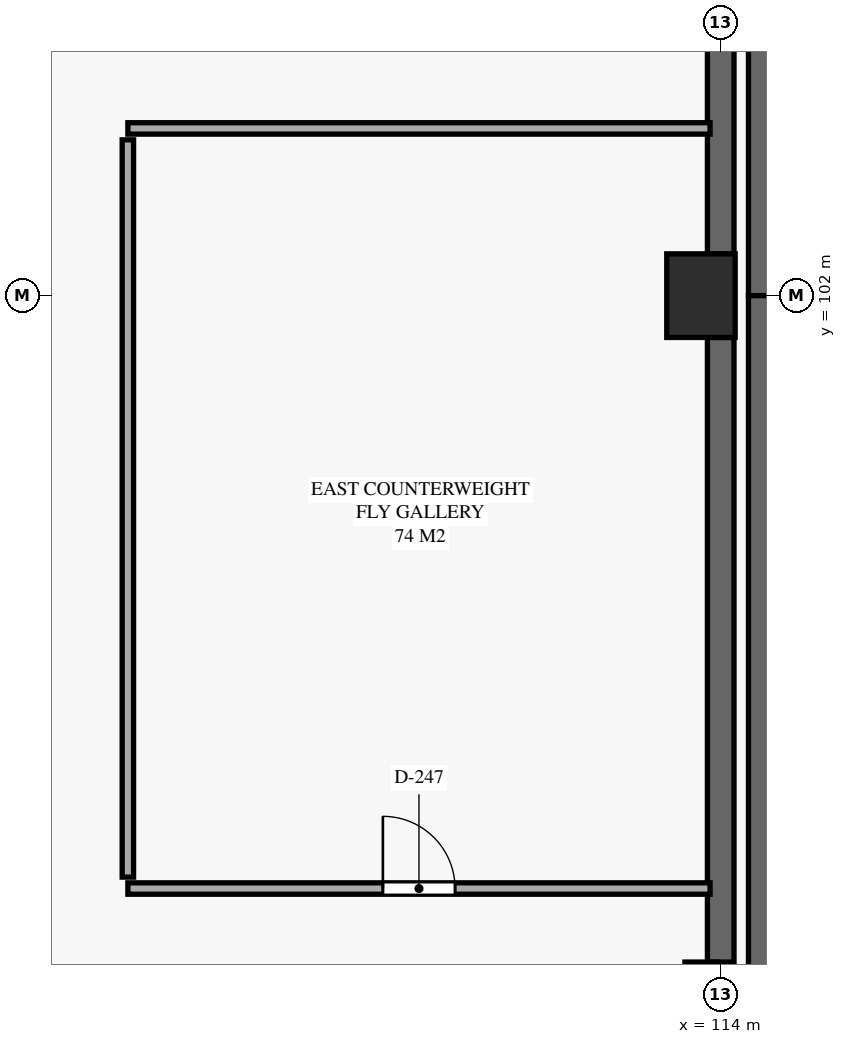
"""IFC4 building model, lengths in metres.
Left out: names, types, materials, properties, quantities, classifications, styles, units other than length and angle.
Written with IfcOpenShell. Run it as: python <this file> out.ifc"""

import sys

from ifc_helpers import new_model, si_unit, direction, frame, frame_2d, origin, origin_2d, place, context, subcontext, project, spatial, rectangle, i_section, extrude, element, fill, save


model = new_model("IFC4")
c1 = context("Model", 3, precision=1e-05, world=origin(), true_north=direction((0.0, 1.0)))
c2 = subcontext(c1, "Body", "Model", "MODEL_VIEW")
j1 = project(units=[si_unit("LENGTHUNIT", "METRE"), si_unit("PLANEANGLEUNIT", "RADIAN")], contexts=[c1])
p1 = place(None, origin())
s1 = spatial("IfcSite", under=j1, at=p1, CompositionType="ELEMENT")
p2 = place(p1, origin())
s2 = spatial("IfcBuilding", under=s1, at=p2, CompositionType="ELEMENT")
p3 = place(p2, frame((0.0, 0.0, 24.8)))
s3 = spatial("IfcBuildingStorey", under=s2, at=p3, CompositionType="ELEMENT", Elevation=24.8)
p4 = place(p3, frame((113.74, 93.0, 0.0), z_axis=(0.0, 0.0, 1.0), x_axis=(1.0, 0.0, 0.0)))
e1 = element("IfcColumn", 1, at=p4, inside=s3, PredefinedType="COLUMN", context=c2, shape_type="SweptSolid", body=[
    extrude(i_section(OverallWidth=0.422, OverallDepth=0.465, WebThickness=0.045, FlangeThickness=0.073, FilletRadius=0.02, at=origin_2d()), origin(), (0.0, 0.0, 1.0), 4.8),
])
p5 = place(p3, frame((113.74, 102.0, 0.0), z_axis=(0.0, 0.0, 1.0), x_axis=(1.0, 0.0, 0.0)))
e2 = element("IfcColumn", 2, at=p5, inside=s3, PredefinedType="COLUMN", context=c2, shape_type="SweptSolid", body=[
    extrude(rectangle(XDim=0.9, YDim=1.1, at=origin_2d()), origin(), (0.0, 0.0, 1.0), 4.8),
])
p6 = place(p3, frame((114.0, 93.232, 0.0), z_axis=(0.0, 0.0, 1.0), x_axis=(0.0, 1.0, 0.0)))
e3 = element("IfcWall", 3, at=p6, inside=s3, PredefinedType="SHEAR", context=c2, shape_type="SweptSolid", body=[
    extrude(rectangle(XDim=8.218, YDim=0.35, at=frame_2d((4.109, 0.0))), origin(), (0.0, 0.0, 1.0), 4.56),
])
p7 = place(p3, frame((114.0, 102.55, 0.0), z_axis=(0.0, 0.0, 1.0), x_axis=(0.0, 1.0, 0.0)))
e4 = element("IfcWall", 4, at=p7, inside=s3, PredefinedType="SHEAR", context=c2, shape_type="SweptSolid", body=[
    extrude(rectangle(XDim=5.25, YDim=0.35, at=frame_2d((2.625, 0.0))), origin(), (0.0, 0.0, 1.0), 4.56),
])
p8 = place(p3, frame((114.54, 110.0, 0.0), z_axis=(0.0, 0.0, 1.0), x_axis=(0.0, -1.0, 0.0)))
e5 = element("IfcWall", 5, at=p8, inside=s3, PredefinedType="SHEAR", context=c2, shape_type="SweptSolid", body=[
    extrude(rectangle(XDim=8.0, YDim=0.35, at=frame_2d((4.0, 0.0))), origin(), (0.0, 0.0, 1.0), 4.56),
])
p9 = place(p3, frame((114.54, 102.0, 0.0), z_axis=(0.0, 0.0, 1.0), x_axis=(0.0, -1.0, 0.0)))
e6 = element("IfcWall", 6, at=p9, inside=s3, PredefinedType="SHEAR", context=c2, shape_type="SweptSolid", body=[
    extrude(rectangle(XDim=9.0, YDim=0.35, at=frame_2d((4.5, 0.0))), origin(), (0.0, 0.0, 1.0), 4.56),
])
p10 = place(p3, frame((106.2, 94.2, 0.0), z_axis=(0.0, 0.0, 1.0), x_axis=(1.0, 0.0, 0.0)))
e7 = element("IfcWall", 7, at=p10, inside=s3, PredefinedType="PARTITIONING", context=c2, shape_type="SweptSolid", body=[
    extrude(rectangle(XDim=7.66, YDim=0.15, at=frame_2d((3.83, 0.0))), origin(), (0.0, 0.0, 1.0), 4.56),
])
p11 = place(p10, frame((3.355, 0.0, 0.0)))
e8 = element("IfcOpeningElement", 8, at=p11, cuts=e7, PredefinedType="OPENING", context=c2, shape_type="SweptSolid", body=[
    extrude(rectangle(XDim=0.95, YDim=2.15, at=frame_2d((0.475, 1.075))), frame((0.0, 0.085, 0.0), z_axis=(0.0, -1.0, 0.0), x_axis=(1.0, 0.0, 0.0)), (0.0, 0.0, 1.0), 0.17),
])
p12 = place(p3, frame((113.86, 104.2, 0.0), z_axis=(0.0, 0.0, 1.0), x_axis=(-1.0, 0.0, 0.0)))
e9 = element("IfcWall", 9, at=p12, inside=s3, PredefinedType="PARTITIONING", context=c2, shape_type="SweptSolid", body=[
    extrude(rectangle(XDim=7.66, YDim=0.15, at=frame_2d((3.83, 0.0))), origin(), (0.0, 0.0, 1.0), 4.56),
])
p13 = place(p3, frame((106.2, 104.05, 0.0), z_axis=(0.0, 0.0, 1.0), x_axis=(0.0, -1.0, 0.0)))
e10 = element("IfcWall", 10, at=p13, inside=s3, PredefinedType="PARTITIONING", context=c2, shape_type="SweptSolid", body=[
    extrude(rectangle(XDim=9.7, YDim=0.15, at=frame_2d((4.85, 0.0))), origin(), (0.0, 0.0, 1.0), 4.56),
])
p14 = place(p11, origin())
e11 = element("IfcDoor", 11, at=p14, inside=s3, OperationType="SINGLE_SWING_LEFT", PredefinedType="DOOR", context=c2, shape_type="SweptSolid", body=[
    extrude(rectangle(XDim=0.95, YDim=2.15, at=frame_2d((0.475, 1.075))), frame((0.0, 0.025, 0.0), z_axis=(0.0, -1.0, 0.0), x_axis=(1.0, 0.0, 0.0)), (0.0, 0.0, 1.0), 0.05),
])
fill(e8, e11)
save(model, sys.argv[1])
